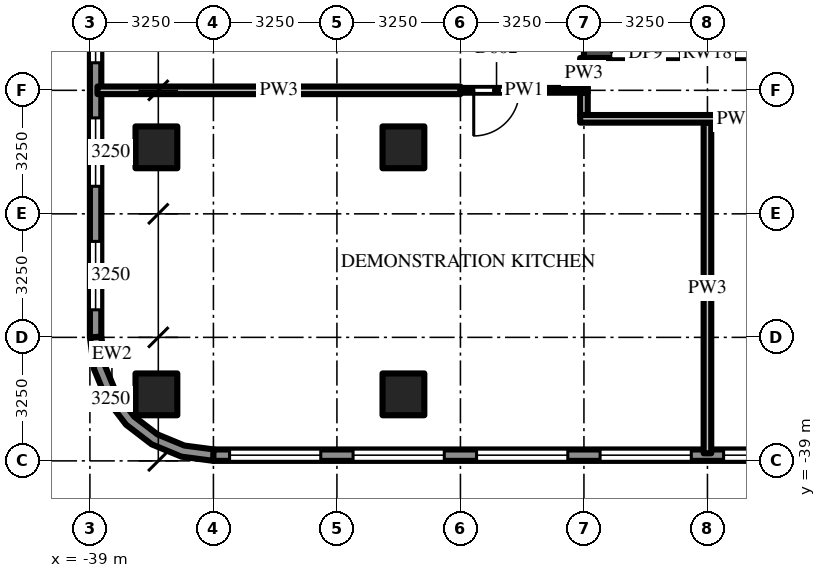
"""IFC4 building model, lengths in metres.
Left out: names, types, materials, properties, quantities, classifications, styles, units other than length and angle.
Written with IfcOpenShell. Run it as: python <this file> out.ifc"""

import sys

from ifc_helpers import new_model, si_unit, direction, frame, frame_2d, origin, origin_2d, place, context, subcontext, project, spatial, polyline, rectangle, outline, extrude, source, transform, mapped, element, fill, save


model = new_model("IFC4")
c1 = context("Model", 3, precision=1e-05, world=origin(), true_north=direction((0.0, 1.0)))
c2 = subcontext(c1, "Body", "Model", "MODEL_VIEW")
j1 = project(units=[si_unit("LENGTHUNIT", "METRE"), si_unit("PLANEANGLEUNIT", "RADIAN")], contexts=[c1])
p1 = place(None, origin())
s1 = spatial("IfcSite", under=j1, at=p1, CompositionType="ELEMENT")
p2 = place(p1, origin())
s2 = spatial("IfcBuilding", under=s1, at=p2, CompositionType="ELEMENT")
p3 = place(p2, frame((0.0, 0.0, 19.0)))
s3 = spatial("IfcBuildingStorey", under=s2, at=p3, CompositionType="ELEMENT", Elevation=19.0)
m1 = source(origin(), c2, "Body", "SweptSolid", [
    extrude(rectangle(XDim=1.1, YDim=1.1, at=origin_2d()), origin(), (0.0, 0.0, 1.0), 5.0),
])
for number, where, z_axis, x_axis in (
    (1, (-30.75, -30.75, 0.0), (0.0, 0.0, 1.0), (1.0, 0.0, 0.0)),
    (2, (-30.75, -37.25, 0.0), (0.0, 0.0, 1.0), (1.0, 0.0, 0.0)),
    (3, (-37.25, -30.75, 0.0), (0.0, 0.0, 1.0), (1.0, 0.0, 0.0)),
    (4, (-37.25, -37.25, 0.0), (0.0, 0.0, 1.0), (1.0, 0.0, 0.0)),
):
    element("IfcColumn", number, at=place(p3, frame(where, z_axis=z_axis, x_axis=x_axis)), inside=s3, PredefinedType="COLUMN", context=c2, shape_type="MappedRepresentation", body=[
        mapped(m1, transform((0.0, 0.0, 0.0))),
    ])
m2 = source(origin(), c2, "Body", "SweptSolid", [
    extrude(rectangle(XDim=6.5, YDim=0.25, at=frame_2d((3.25, 0.0))), origin(), (0.0, 0.0, 1.0), 4.7),
])
p4 = place(p3, frame((-26.0, -28.275, 0.0), z_axis=(0.0, 0.0, 1.0), x_axis=(1.0, 0.0, 0.0)))
e5 = element("IfcWall", 5, at=p4, inside=s3, PredefinedType="SHEAR", context=c2, shape_type="MappedRepresentation", body=[
    mapped(m2, transform((0.0, 0.0, 0.0))),
])
m3 = source(origin(), c2, "Body", "SweptSolid", [
    extrude(rectangle(XDim=1.8, YDim=2.1, at=frame_2d((0.9, 1.05))), frame((0.0, 0.135, 0.0), z_axis=(0.0, -1.0, 0.0), x_axis=(1.0, 0.0, 0.0)), (0.0, 0.0, 1.0), 0.27),
])
p5 = place(p4, frame((0.725, 0.0, 0.0)))
e6 = element("IfcOpeningElement", 6, at=p5, cuts=e5, PredefinedType="OPENING", context=c2, shape_type="MappedRepresentation", body=[
    mapped(m3, transform((0.0, 0.0, 0.0))),
])
p6 = place(p4, frame((3.975, 0.0, 0.0)))
e7 = element("IfcOpeningElement", 7, at=p6, cuts=e5, PredefinedType="OPENING", context=c2, shape_type="MappedRepresentation", body=[
    mapped(m3, transform((0.0, 0.0, 0.0))),
])
m4 = source(origin(), c2, "Body", "SweptSolid", [
    extrude(rectangle(XDim=71.5, YDim=0.3, at=frame_2d((35.75, 0.0))), origin(), (0.0, 0.0, 1.0), 4.7),
])
p7 = place(p3, frame((-38.85, 35.75, 0.0), z_axis=(0.0, 0.0, 1.0), x_axis=(0.0, -1.0, 0.0)))
e8 = element("IfcWall", 8, at=p7, inside=s3, PredefinedType="SOLIDWALL", context=c2, shape_type="MappedRepresentation", body=[
    mapped(m4, transform((0.0, 0.0, 0.0))),
])
m5 = source(origin(), c2, "Body", "SweptSolid", [
    extrude(rectangle(XDim=1.8, YDim=3.0, at=frame_2d((0.9, 1.5))), frame((0.0, 0.16, 0.0), z_axis=(0.0, -1.0, 0.0), x_axis=(1.0, 0.0, 0.0)), (0.0, 0.0, 1.0), 0.32),
])
p8 = place(p7, frame((0.725, 0.0, 0.9)))
e9 = element("IfcOpeningElement", 9, at=p8, cuts=e8, PredefinedType="OPENING", context=c2, shape_type="MappedRepresentation", body=[
    mapped(m5, transform((0.0, 0.0, 0.0))),
])
p9 = place(p7, frame((3.975, 0.0, 0.9)))
e10 = element("IfcOpeningElement", 10, at=p9, cuts=e8, PredefinedType="OPENING", context=c2, shape_type="MappedRepresentation", body=[
    mapped(m5, transform((0.0, 0.0, 0.0))),
])
p10 = place(p7, frame((7.225, 0.0, 0.9)))
e11 = element("IfcOpeningElement", 11, at=p10, cuts=e8, PredefinedType="OPENING", context=c2, shape_type="MappedRepresentation", body=[
    mapped(m5, transform((0.0, 0.0, 0.0))),
])
p11 = place(p7, frame((10.475, 0.0, 0.9)))
e12 = element("IfcOpeningElement", 12, at=p11, cuts=e8, PredefinedType="OPENING", context=c2, shape_type="MappedRepresentation", body=[
    mapped(m5, transform((0.0, 0.0, 0.0))),
])
p12 = place(p7, frame((13.725, 0.0, 0.9)))
e13 = element("IfcOpeningElement", 13, at=p12, cuts=e8, PredefinedType="OPENING", context=c2, shape_type="MappedRepresentation", body=[
    mapped(m5, transform((0.0, 0.0, 0.0))),
])
p13 = place(p7, frame((16.975, 0.0, 0.9)))
e14 = element("IfcOpeningElement", 14, at=p13, cuts=e8, PredefinedType="OPENING", context=c2, shape_type="MappedRepresentation", body=[
    mapped(m5, transform((0.0, 0.0, 0.0))),
])
p14 = place(p7, frame((20.225, 0.0, 0.9)))
e15 = element("IfcOpeningElement", 15, at=p14, cuts=e8, PredefinedType="OPENING", context=c2, shape_type="MappedRepresentation", body=[
    mapped(m5, transform((0.0, 0.0, 0.0))),
])
p15 = place(p7, frame((23.475, 0.0, 0.9)))
e16 = element("IfcOpeningElement", 16, at=p15, cuts=e8, PredefinedType="OPENING", context=c2, shape_type="MappedRepresentation", body=[
    mapped(m5, transform((0.0, 0.0, 0.0))),
])
p16 = place(p7, frame((26.725, 0.0, 0.9)))
e17 = element("IfcOpeningElement", 17, at=p16, cuts=e8, PredefinedType="OPENING", context=c2, shape_type="MappedRepresentation", body=[
    mapped(m5, transform((0.0, 0.0, 0.0))),
])
p17 = place(p7, frame((29.975, 0.0, 0.9)))
e18 = element("IfcOpeningElement", 18, at=p17, cuts=e8, PredefinedType="OPENING", context=c2, shape_type="MappedRepresentation", body=[
    mapped(m5, transform((0.0, 0.0, 0.0))),
])
p18 = place(p7, frame((33.225, 0.0, 0.9)))
e19 = element("IfcOpeningElement", 19, at=p18, cuts=e8, PredefinedType="OPENING", context=c2, shape_type="MappedRepresentation", body=[
    mapped(m5, transform((0.0, 0.0, 0.0))),
])
p19 = place(p7, frame((36.475, 0.0, 0.9)))
e20 = element("IfcOpeningElement", 20, at=p19, cuts=e8, PredefinedType="OPENING", context=c2, shape_type="MappedRepresentation", body=[
    mapped(m5, transform((0.0, 0.0, 0.0))),
])
p20 = place(p7, frame((39.725, 0.0, 0.9)))
e21 = element("IfcOpeningElement", 21, at=p20, cuts=e8, PredefinedType="OPENING", context=c2, shape_type="MappedRepresentation", body=[
    mapped(m5, transform((0.0, 0.0, 0.0))),
])
p21 = place(p7, frame((42.975, 0.0, 0.9)))
e22 = element("IfcOpeningElement", 22, at=p21, cuts=e8, PredefinedType="OPENING", context=c2, shape_type="MappedRepresentation", body=[
    mapped(m5, transform((0.0, 0.0, 0.0))),
])
p22 = place(p7, frame((46.225, 0.0, 0.9)))
e23 = element("IfcOpeningElement", 23, at=p22, cuts=e8, PredefinedType="OPENING", context=c2, shape_type="MappedRepresentation", body=[
    mapped(m5, transform((0.0, 0.0, 0.0))),
])
p23 = place(p7, frame((49.475, 0.0, 0.9)))
e24 = element("IfcOpeningElement", 24, at=p23, cuts=e8, PredefinedType="OPENING", context=c2, shape_type="MappedRepresentation", body=[
    mapped(m5, transform((0.0, 0.0, 0.0))),
])
p24 = place(p7, frame((52.725, 0.0, 0.9)))
e25 = element("IfcOpeningElement", 25, at=p24, cuts=e8, PredefinedType="OPENING", context=c2, shape_type="MappedRepresentation", body=[
    mapped(m5, transform((0.0, 0.0, 0.0))),
])
p25 = place(p7, frame((55.975, 0.0, 0.9)))
e26 = element("IfcOpeningElement", 26, at=p25, cuts=e8, PredefinedType="OPENING", context=c2, shape_type="MappedRepresentation", body=[
    mapped(m5, transform((0.0, 0.0, 0.0))),
])
p26 = place(p7, frame((59.225, 0.0, 0.9)))
e27 = element("IfcOpeningElement", 27, at=p26, cuts=e8, PredefinedType="OPENING", context=c2, shape_type="MappedRepresentation", body=[
    mapped(m5, transform((0.0, 0.0, 0.0))),
])
p27 = place(p7, frame((62.475, 0.0, 0.9)))
e28 = element("IfcOpeningElement", 28, at=p27, cuts=e8, PredefinedType="OPENING", context=c2, shape_type="MappedRepresentation", body=[
    mapped(m5, transform((0.0, 0.0, 0.0))),
])
p28 = place(p7, frame((65.725, 0.0, 0.9)))
e29 = element("IfcOpeningElement", 29, at=p28, cuts=e8, PredefinedType="OPENING", context=c2, shape_type="MappedRepresentation", body=[
    mapped(m5, transform((0.0, 0.0, 0.0))),
])
p29 = place(p7, frame((68.975, 0.0, 0.9)))
e30 = element("IfcOpeningElement", 30, at=p29, cuts=e8, PredefinedType="OPENING", context=c2, shape_type="MappedRepresentation", body=[
    mapped(m5, transform((0.0, 0.0, 0.0))),
])
m6 = source(origin(), c2, "Body", "SweptSolid", [
    extrude(outline(polyline([(-39.0, -35.75), (-38.889, -36.591), (-38.565, -37.375), (-38.048, -38.048), (-37.375, -38.565), (-36.591, -38.889), (-35.75, -39.0), (-35.73, -38.7), (-36.513, -38.597), (-37.224, -38.302), (-37.834, -37.834), (-38.302, -37.224), (-38.597, -36.513), (-38.7, -35.73), (-39.0, -35.75)])), origin(), (0.0, 0.0, 1.0), 4.7),
])
p30 = place(p3, origin())
e31 = element("IfcWall", 31, at=p30, inside=s3, PredefinedType="SOLIDWALL", context=c2, shape_type="MappedRepresentation", body=[
    mapped(m6, transform((0.0, 0.0, 0.0))),
])
p31 = place(p3, frame((-35.75, -38.85, 0.0), z_axis=(0.0, 0.0, 1.0), x_axis=(1.0, 0.0, 0.0)))
e32 = element("IfcWall", 32, at=p31, inside=s3, PredefinedType="SOLIDWALL", context=c2, shape_type="MappedRepresentation", body=[
    mapped(m4, transform((0.0, 0.0, 0.0))),
])
m7 = source(origin(), c2, "Body", "SweptSolid", [
    extrude(rectangle(XDim=2.4, YDim=3.0, at=frame_2d((1.2, 1.5))), frame((0.0, 0.16, 0.0), z_axis=(0.0, -1.0, 0.0), x_axis=(1.0, 0.0, 0.0)), (0.0, 0.0, 1.0), 0.32),
])
p32 = place(p31, frame((0.425, 0.0, 0.9)))
e33 = element("IfcOpeningElement", 33, at=p32, cuts=e32, PredefinedType="OPENING", context=c2, shape_type="MappedRepresentation", body=[
    mapped(m7, transform((0.0, 0.0, 0.0))),
])
p33 = place(p31, frame((3.675, 0.0, 0.9)))
e34 = element("IfcOpeningElement", 34, at=p33, cuts=e32, PredefinedType="OPENING", context=c2, shape_type="MappedRepresentation", body=[
    mapped(m7, transform((0.0, 0.0, 0.0))),
])
p34 = place(p31, frame((6.925, 0.0, 0.9)))
e35 = element("IfcOpeningElement", 35, at=p34, cuts=e32, PredefinedType="OPENING", context=c2, shape_type="MappedRepresentation", body=[
    mapped(m7, transform((0.0, 0.0, 0.0))),
])
p35 = place(p31, frame((10.175, 0.0, 0.9)))
e36 = element("IfcOpeningElement", 36, at=p35, cuts=e32, PredefinedType="OPENING", context=c2, shape_type="MappedRepresentation", body=[
    mapped(m7, transform((0.0, 0.0, 0.0))),
])
p36 = place(p31, frame((13.425, 0.0, 0.9)))
e37 = element("IfcOpeningElement", 37, at=p36, cuts=e32, PredefinedType="OPENING", context=c2, shape_type="MappedRepresentation", body=[
    mapped(m7, transform((0.0, 0.0, 0.0))),
])
p37 = place(p31, frame((16.675, 0.0, 0.9)))
e38 = element("IfcOpeningElement", 38, at=p37, cuts=e32, PredefinedType="OPENING", context=c2, shape_type="MappedRepresentation", body=[
    mapped(m7, transform((0.0, 0.0, 0.0))),
])
p38 = place(p31, frame((19.925, 0.0, 0.9)))
e39 = element("IfcOpeningElement", 39, at=p38, cuts=e32, PredefinedType="OPENING", context=c2, shape_type="MappedRepresentation", body=[
    mapped(m7, transform((0.0, 0.0, 0.0))),
])
p39 = place(p31, frame((23.175, 0.0, 0.9)))
e40 = element("IfcOpeningElement", 40, at=p39, cuts=e32, PredefinedType="OPENING", context=c2, shape_type="MappedRepresentation", body=[
    mapped(m7, transform((0.0, 0.0, 0.0))),
])
p40 = place(p31, frame((26.425, 0.0, 0.9)))
e41 = element("IfcOpeningElement", 41, at=p40, cuts=e32, PredefinedType="OPENING", context=c2, shape_type="MappedRepresentation", body=[
    mapped(m7, transform((0.0, 0.0, 0.0))),
])
p41 = place(p31, frame((29.675, 0.0, 0.9)))
e42 = element("IfcOpeningElement", 42, at=p41, cuts=e32, PredefinedType="OPENING", context=c2, shape_type="MappedRepresentation", body=[
    mapped(m7, transform((0.0, 0.0, 0.0))),
])
p42 = place(p31, frame((32.925, 0.0, 0.9)))
e43 = element("IfcOpeningElement", 43, at=p42, cuts=e32, PredefinedType="OPENING", context=c2, shape_type="MappedRepresentation", body=[
    mapped(m7, transform((0.0, 0.0, 0.0))),
])
p43 = place(p31, frame((36.175, 0.0, 0.9)))
e44 = element("IfcOpeningElement", 44, at=p43, cuts=e32, PredefinedType="OPENING", context=c2, shape_type="MappedRepresentation", body=[
    mapped(m7, transform((0.0, 0.0, 0.0))),
])
p44 = place(p31, frame((39.425, 0.0, 0.9)))
e45 = element("IfcOpeningElement", 45, at=p44, cuts=e32, PredefinedType="OPENING", context=c2, shape_type="MappedRepresentation", body=[
    mapped(m7, transform((0.0, 0.0, 0.0))),
])
p45 = place(p31, frame((42.675, 0.0, 0.9)))
e46 = element("IfcOpeningElement", 46, at=p45, cuts=e32, PredefinedType="OPENING", context=c2, shape_type="MappedRepresentation", body=[
    mapped(m7, transform((0.0, 0.0, 0.0))),
])
p46 = place(p31, frame((45.925, 0.0, 0.9)))
e47 = element("IfcOpeningElement", 47, at=p46, cuts=e32, PredefinedType="OPENING", context=c2, shape_type="MappedRepresentation", body=[
    mapped(m7, transform((0.0, 0.0, 0.0))),
])
p47 = place(p31, frame((49.175, 0.0, 0.9)))
e48 = element("IfcOpeningElement", 48, at=p47, cuts=e32, PredefinedType="OPENING", context=c2, shape_type="MappedRepresentation", body=[
    mapped(m7, transform((0.0, 0.0, 0.0))),
])
p48 = place(p31, frame((52.425, 0.0, 0.9)))
e49 = element("IfcOpeningElement", 49, at=p48, cuts=e32, PredefinedType="OPENING", context=c2, shape_type="MappedRepresentation", body=[
    mapped(m7, transform((0.0, 0.0, 0.0))),
])
p49 = place(p31, frame((55.675, 0.0, 0.9)))
e50 = element("IfcOpeningElement", 50, at=p49, cuts=e32, PredefinedType="OPENING", context=c2, shape_type="MappedRepresentation", body=[
    mapped(m7, transform((0.0, 0.0, 0.0))),
])
p50 = place(p31, frame((58.925, 0.0, 0.9)))
e51 = element("IfcOpeningElement", 51, at=p50, cuts=e32, PredefinedType="OPENING", context=c2, shape_type="MappedRepresentation", body=[
    mapped(m7, transform((0.0, 0.0, 0.0))),
])
p51 = place(p31, frame((62.175, 0.0, 0.9)))
e52 = element("IfcOpeningElement", 52, at=p51, cuts=e32, PredefinedType="OPENING", context=c2, shape_type="MappedRepresentation", body=[
    mapped(m7, transform((0.0, 0.0, 0.0))),
])
p52 = place(p31, frame((65.425, 0.0, 0.9)))
e53 = element("IfcOpeningElement", 53, at=p52, cuts=e32, PredefinedType="OPENING", context=c2, shape_type="MappedRepresentation", body=[
    mapped(m7, transform((0.0, 0.0, 0.0))),
])
p53 = place(p31, frame((68.675, 0.0, 0.9)))
e54 = element("IfcOpeningElement", 54, at=p53, cuts=e32, PredefinedType="OPENING", context=c2, shape_type="MappedRepresentation", body=[
    mapped(m7, transform((0.0, 0.0, 0.0))),
])
m8 = source(origin(), c2, "Body", "SweptSolid", [
    extrude(rectangle(XDim=0.788, YDim=0.2, at=frame_2d((0.394, 0.0))), origin(), (0.0, 0.0, 1.0), 4.7),
])
p54 = place(p3, frame((-26.0, -29.188, 0.0), z_axis=(0.0, 0.0, 1.0), x_axis=(0.0, 1.0, 0.0)))
e55 = element("IfcWall", 55, at=p54, inside=s3, PredefinedType="PARTITIONING", context=c2, shape_type="MappedRepresentation", body=[
    mapped(m8, transform((0.0, 0.0, 0.0))),
])
m9 = source(origin(), c2, "Body", "SweptSolid", [
    extrude(rectangle(XDim=0.587, YDim=0.2, at=frame_2d((0.294, 0.0))), origin(), (0.0, 0.0, 1.0), 4.7),
])
p55 = place(p3, frame((-26.0, -29.9, 0.0), z_axis=(0.0, 0.0, 1.0), x_axis=(0.0, 1.0, 0.0)))
e56 = element("IfcWall", 56, at=p55, inside=s3, PredefinedType="PARTITIONING", context=c2, shape_type="MappedRepresentation", body=[
    mapped(m9, transform((0.0, 0.0, 0.0))),
])
m10 = source(origin(), c2, "Body", "SweptSolid", [
    extrude(rectangle(XDim=8.7, YDim=0.2, at=frame_2d((4.35, 0.0))), origin(), (0.0, 0.0, 1.0), 3.762),
])
p56 = place(p3, frame((-22.75, -38.8, 0.0), z_axis=(0.0, 0.0, 1.0), x_axis=(0.0, 1.0, 0.0)))
e57 = element("IfcWall", 57, at=p56, inside=s3, PredefinedType="PARTITIONING", context=c2, shape_type="MappedRepresentation", body=[
    mapped(m10, transform((0.0, 0.0, 0.0))),
])
m11 = source(origin(), c2, "Body", "SweptSolid", [
    extrude(rectangle(XDim=8.2, YDim=0.2, at=frame_2d((4.1, 0.0))), origin(), (0.0, 0.0, 1.0), 3.762),
])
p57 = place(p3, frame((-17.9, -30.0, 0.0), z_axis=(0.0, 0.0, 1.0), x_axis=(-1.0, 0.0, 0.0)))
e58 = element("IfcWall", 58, at=p57, inside=s3, PredefinedType="PARTITIONING", context=c2, shape_type="MappedRepresentation", body=[
    mapped(m11, transform((0.0, 0.0, 0.0))),
])
p58 = place(p3, frame((-38.8, -29.25, 0.0), z_axis=(0.0, 0.0, 1.0), x_axis=(1.0, 0.0, 0.0)))
e59 = element("IfcWall", 59, at=p58, inside=s3, PredefinedType="PARTITIONING", context=c2, shape_type="SweptSolid", body=[
    extrude(rectangle(XDim=9.55, YDim=0.2, at=frame_2d((4.775, 0.0))), origin(), (0.0, 0.0, 1.0), 3.762),
])
p59 = place(p3, frame((-25.9, -29.25, 0.0), z_axis=(0.0, 0.0, 1.0), x_axis=(-1.0, 0.0, 0.0)))
e60 = element("IfcWall", 60, at=p59, inside=s3, PredefinedType="PARTITIONING", context=c2, shape_type="SweptSolid", body=[
    extrude(rectangle(XDim=3.35, YDim=0.125, at=frame_2d((1.675, 0.0))), origin(), (0.0, 0.0, 1.0), 4.7),
])
m12 = source(origin(), c2, "Body", "SweptSolid", [
    extrude(rectangle(XDim=1.2, YDim=2.1, at=frame_2d((0.6, 1.05))), frame((0.0, 0.073, 0.0), z_axis=(0.0, -1.0, 0.0), x_axis=(1.0, 0.0, 0.0)), (0.0, 0.0, 1.0), 0.145),
])
p60 = place(p59, frame((1.8, 0.0, 0.0)))
e61 = element("IfcOpeningElement", 61, at=p60, cuts=e60, PredefinedType="OPENING", context=c2, shape_type="MappedRepresentation", body=[
    mapped(m12, transform((0.0, 0.0, 0.0))),
])
m13 = source(origin(), c2, "Body", "SweptSolid", [
    extrude(rectangle(XDim=1.8, YDim=2.1, at=frame_2d((0.9, 1.05))), frame((0.0, 0.025, 0.0), z_axis=(0.0, -1.0, 0.0), x_axis=(1.0, 0.0, 0.0)), (0.0, 0.0, 1.0), 0.05),
])
p61 = place(p5, origin())
e62 = element("IfcDoor", 62, at=p61, inside=s3, OperationType="DOUBLE_DOOR_SINGLE_SWING", PredefinedType="DOOR", context=c2, shape_type="MappedRepresentation", body=[
    mapped(m13, transform((0.0, 0.0, 0.0))),
])
fill(e6, e62)
p62 = place(p6, origin())
e63 = element("IfcDoor", 63, at=p62, inside=s3, OperationType="DOUBLE_DOOR_SINGLE_SWING", PredefinedType="DOOR", context=c2, shape_type="MappedRepresentation", body=[
    mapped(m13, transform((0.0, 0.0, 0.0))),
])
fill(e7, e63)
m14 = source(origin(), c2, "Body", "SweptSolid", [
    extrude(rectangle(XDim=1.8, YDim=3.0, at=frame_2d((0.9, 1.5))), frame((0.0, 0.03, 0.0), z_axis=(0.0, -1.0, 0.0), x_axis=(1.0, 0.0, 0.0)), (0.0, 0.0, 1.0), 0.06),
])
p63 = place(p27, origin())
e64 = element("IfcWindow", 64, at=p63, inside=s3, PartitioningType="SINGLE_PANEL", PredefinedType="WINDOW", context=c2, shape_type="MappedRepresentation", body=[
    mapped(m14, transform((0.0, 0.0, 0.0))),
])
fill(e28, e64)
p64 = place(p28, origin())
e65 = element("IfcWindow", 65, at=p64, inside=s3, PartitioningType="SINGLE_PANEL", PredefinedType="WINDOW", context=c2, shape_type="MappedRepresentation", body=[
    mapped(m14, transform((0.0, 0.0, 0.0))),
])
fill(e29, e65)
p65 = place(p29, origin())
e66 = element("IfcWindow", 66, at=p65, inside=s3, PartitioningType="SINGLE_PANEL", PredefinedType="WINDOW", context=c2, shape_type="MappedRepresentation", body=[
    mapped(m14, transform((0.0, 0.0, 0.0))),
])
fill(e30, e66)
m15 = source(origin(), c2, "Body", "SweptSolid", [
    extrude(rectangle(XDim=2.4, YDim=3.0, at=frame_2d((1.2, 1.5))), frame((0.0, 0.03, 0.0), z_axis=(0.0, -1.0, 0.0), x_axis=(1.0, 0.0, 0.0)), (0.0, 0.0, 1.0), 0.06),
])
p66 = place(p32, origin())
e67 = element("IfcWindow", 67, at=p66, inside=s3, PartitioningType="SINGLE_PANEL", PredefinedType="WINDOW", context=c2, shape_type="MappedRepresentation", body=[
    mapped(m15, transform((0.0, 0.0, 0.0))),
])
fill(e33, e67)
p67 = place(p33, origin())
e68 = element("IfcWindow", 68, at=p67, inside=s3, PartitioningType="SINGLE_PANEL", PredefinedType="WINDOW", context=c2, shape_type="MappedRepresentation", body=[
    mapped(m15, transform((0.0, 0.0, 0.0))),
])
fill(e34, e68)
p68 = place(p34, origin())
e69 = element("IfcWindow", 69, at=p68, inside=s3, PartitioningType="SINGLE_PANEL", PredefinedType="WINDOW", context=c2, shape_type="MappedRepresentation", body=[
    mapped(m15, transform((0.0, 0.0, 0.0))),
])
fill(e35, e69)
p69 = place(p35, origin())
e70 = element("IfcWindow", 70, at=p69, inside=s3, PartitioningType="SINGLE_PANEL", PredefinedType="WINDOW", context=c2, shape_type="MappedRepresentation", body=[
    mapped(m15, transform((0.0, 0.0, 0.0))),
])
fill(e36, e70)
p70 = place(p36, origin())
e71 = element("IfcWindow", 71, at=p70, inside=s3, PartitioningType="SINGLE_PANEL", PredefinedType="WINDOW", context=c2, shape_type="MappedRepresentation", body=[
    mapped(m15, transform((0.0, 0.0, 0.0))),
])
fill(e37, e71)
m16 = source(origin(), c2, "Body", "SweptSolid", [
    extrude(rectangle(XDim=1.2, YDim=2.1, at=frame_2d((0.6, 1.05))), frame((0.0, 0.025, 0.0), z_axis=(0.0, -1.0, 0.0), x_axis=(1.0, 0.0, 0.0)), (0.0, 0.0, 1.0), 0.05),
])
p71 = place(p60, origin())
e72 = element("IfcDoor", 72, at=p71, inside=s3, OperationType="SINGLE_SWING_RIGHT", PredefinedType="DOOR", context=c2, shape_type="MappedRepresentation", body=[
    mapped(m16, transform((0.0, 0.0, 0.0))),
])
fill(e61, e72)
save(model, sys.argv[1])
